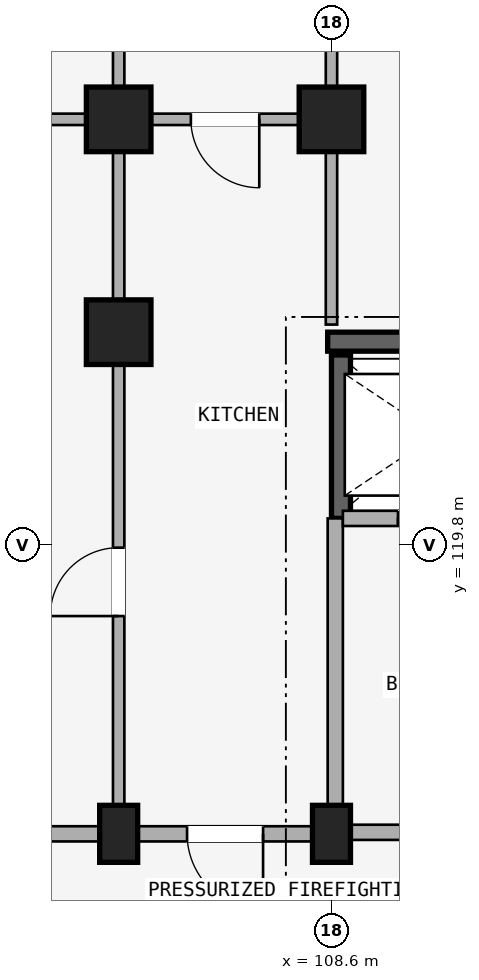
"""IFC4 building model, lengths in metres.
Left out: names, types, materials, properties, quantities, classifications, styles, units other than length and angle.
Written with IfcOpenShell. Run it as: python <this file> out.ifc"""

import sys

from ifc_helpers import new_model, si_unit, direction, frame, frame_2d, origin, origin_2d, place, context, subcontext, project, spatial, rectangle, extrude, element, fill, save


model = new_model("IFC4")
c1 = context("Model", 3, precision=1e-05, world=origin(), true_north=direction((0.0, 1.0)))
c2 = subcontext(c1, "Body", "Model", "MODEL_VIEW")
j1 = project(units=[si_unit("LENGTHUNIT", "METRE"), si_unit("PLANEANGLEUNIT", "RADIAN")], contexts=[c1])
p1 = place(None, origin())
s1 = spatial("IfcSite", under=j1, at=p1, CompositionType="ELEMENT")
p2 = place(p1, origin())
s2 = spatial("IfcBuilding", under=s1, at=p2, CompositionType="ELEMENT")
p3 = place(p2, frame((0.0, 0.0, 4.5)))
s3 = spatial("IfcBuildingStorey", under=s2, at=p3, CompositionType="ELEMENT", Elevation=4.5)
p4 = place(p3, frame((111.35, 122.475, 0.0), z_axis=(0.0, 0.0, 1.0), x_axis=(-1.0, 0.0, 0.0)))
e1 = element("IfcWall", 1, at=p4, inside=s3, PredefinedType="SHEAR", context=c2, shape_type="SweptSolid", body=[
    extrude(rectangle(XDim=2.8, YDim=0.25, at=frame_2d((1.4, 0.0))), origin(), (0.0, 0.0, 1.0), 3.98),
])
p5 = place(p3, frame((108.725, 120.15, 0.0), z_axis=(0.0, 0.0, 1.0), x_axis=(0.0, 1.0, 0.0)))
e2 = element("IfcWall", 2, at=p5, inside=s3, PredefinedType="SHEAR", context=c2, shape_type="SweptSolid", body=[
    extrude(rectangle(XDim=2.15, YDim=0.25, at=frame_2d((1.075, 0.0))), origin(), (0.0, 0.0, 1.0), 3.98),
])
p6 = place(p3, frame((108.6, 116.0, 0.0), z_axis=(0.0, 0.0, 1.0), x_axis=(1.0, 0.0, 0.0)))
e3 = element("IfcColumn", 3, at=p6, inside=s3, PredefinedType="COLUMN", context=c2, shape_type="SweptSolid", body=[
    extrude(rectangle(XDim=0.5, YDim=0.75, at=origin_2d()), origin(), (0.0, 0.0, 1.0), 3.98),
])
p7 = place(p3, frame((108.6, 125.4, 0.0), z_axis=(0.0, 0.0, 1.0), x_axis=(1.0, 0.0, 0.0)))
e4 = element("IfcColumn", 4, at=p7, inside=s3, PredefinedType="COLUMN", context=c2, shape_type="SweptSolid", body=[
    extrude(rectangle(XDim=0.85, YDim=0.85, at=origin_2d()), origin(), (0.0, 0.0, 1.0), 3.98),
])
p8 = place(p3, frame((105.8, 116.0, 0.0), z_axis=(0.0, 0.0, 1.0), x_axis=(1.0, 0.0, 0.0)))
e5 = element("IfcColumn", 5, at=p8, inside=s3, PredefinedType="COLUMN", context=c2, shape_type="SweptSolid", body=[
    extrude(rectangle(XDim=0.5, YDim=0.75, at=origin_2d()), origin(), (0.0, 0.0, 1.0), 3.98),
])
for number, where, z_axis, x_axis in (
    (6, (105.8, 122.6, 0.0), (0.0, 0.0, 1.0), (1.0, 0.0, 0.0)),
    (7, (105.8, 125.4, 0.0), (0.0, 0.0, 1.0), (1.0, 0.0, 0.0)),
):
    element("IfcColumn", number, at=place(p3, frame(where, z_axis=z_axis, x_axis=x_axis)), inside=s3, PredefinedType="COLUMN", context=c2, shape_type="SweptSolid", body=[
        extrude(rectangle(XDim=0.85, YDim=0.85, at=origin_2d()), origin(), (0.0, 0.0, 1.0), 3.98),
    ])
p9 = place(p3, frame((114.3, 116.02, 0.0), z_axis=(0.0, 0.0, 1.0), x_axis=(-1.0, 0.0, 0.0)))
e8 = element("IfcWall", 8, at=p9, inside=s3, PredefinedType="STANDARD", context=c2, shape_type="SweptSolid", body=[
    extrude(rectangle(XDim=5.65, YDim=0.2, at=frame_2d((2.825, 0.0))), origin(), (0.0, 0.0, 1.0), 3.322),
])
p10 = place(p9, frame((1.923, 0.0, 0.0)))
e9 = element("IfcOpeningElement", 9, at=p10, cuts=e8, PredefinedType="OPENING", context=c2, shape_type="SweptSolid", body=[
    extrude(rectangle(XDim=1.24, YDim=2.15, at=frame_2d((0.62, 1.075))), frame((0.0, 0.11, 0.0), z_axis=(0.0, -1.0, 0.0), x_axis=(1.0, 0.0, 0.0)), (0.0, 0.0, 1.0), 0.22),
])
p11 = place(p3, frame((108.65, 116.02, 0.0), z_axis=(0.0, 0.0, 1.0), x_axis=(0.0, 1.0, 0.0)))
e10 = element("IfcWall", 10, at=p11, inside=s3, PredefinedType="STANDARD", context=c2, shape_type="SweptSolid", body=[
    extrude(rectangle(XDim=4.13, YDim=0.2, at=frame_2d((2.065, 0.0))), origin(), (0.0, 0.0, 1.0), 3.322),
])
p12 = place(p3, frame((111.3, 120.15, 0.0), z_axis=(0.0, 0.0, 1.0), x_axis=(-1.0, 0.0, 0.0)))
e11 = element("IfcWall", 11, at=p12, inside=s3, PredefinedType="STANDARD", context=c2, shape_type="SweptSolid", body=[
    extrude(rectangle(XDim=2.55, YDim=0.2, at=frame_2d((1.275, 0.0))), origin(), (0.0, 0.0, 1.0), 3.322),
])
p13 = place(p12, frame((0.725, 0.0, 0.0)))
e12 = element("IfcOpeningElement", 12, at=p13, cuts=e11, PredefinedType="OPENING", context=c2, shape_type="SweptSolid", body=[
    extrude(rectangle(XDim=1.1, YDim=2.15, at=frame_2d((0.55, 1.075))), frame((0.0, 0.11, 0.0), z_axis=(0.0, -1.0, 0.0), x_axis=(1.0, 0.0, 0.0)), (0.0, 0.0, 1.0), 0.22),
])
p14 = place(p3, frame((108.6, 116.0, 0.0), z_axis=(0.0, 0.0, 1.0), x_axis=(-1.0, 0.0, 0.0)))
e13 = element("IfcWall", 13, at=p14, inside=s3, PredefinedType="STANDARD", context=c2, shape_type="SweptSolid", body=[
    extrude(rectangle(XDim=2.8, YDim=0.2, at=frame_2d((1.4, 0.0))), origin(), (0.0, 0.0, 1.0), 3.322),
])
p15 = place(p14, frame((0.9, 0.0, 0.0)))
e14 = element("IfcOpeningElement", 14, at=p15, cuts=e13, PredefinedType="OPENING", context=c2, shape_type="SweptSolid", body=[
    extrude(rectangle(XDim=1.0, YDim=2.15, at=frame_2d((0.5, 1.075))), frame((0.0, 0.11, 0.0), z_axis=(0.0, -1.0, 0.0), x_axis=(1.0, 0.0, 0.0)), (0.0, 0.0, 1.0), 0.22),
])
p16 = place(p3, frame((108.52, 125.4, 0.0), z_axis=(0.0, 0.0, 1.0), x_axis=(-1.0, 0.0, 0.0)))
e15 = element("IfcWall", 15, at=p16, inside=s3, PredefinedType="PLUMBINGWALL", context=c2, shape_type="SweptSolid", body=[
    extrude(rectangle(XDim=2.64, YDim=0.15, at=frame_2d((1.32, 0.0))), origin(), (0.0, 0.0, 1.0), 3.322),
])
p17 = place(p16, frame((0.87, 0.0, 0.0)))
e16 = element("IfcOpeningElement", 16, at=p17, cuts=e15, PredefinedType="OPENING", context=c2, shape_type="SweptSolid", body=[
    extrude(rectangle(XDim=0.9, YDim=2.1, at=frame_2d((0.45, 1.05))), frame((0.0, 0.085, 0.0), z_axis=(0.0, -1.0, 0.0), x_axis=(1.0, 0.0, 0.0)), (0.0, 0.0, 1.0), 0.17),
])
p18 = place(p3, frame((105.8, 116.0, 0.0), z_axis=(0.0, 0.0, 1.0), x_axis=(-1.0, 0.0, 0.0)))
e17 = element("IfcWall", 17, at=p18, inside=s3, PredefinedType="STANDARD", context=c2, shape_type="SweptSolid", body=[
    extrude(rectangle(XDim=2.8, YDim=0.2, at=frame_2d((1.4, 0.0))), origin(), (0.0, 0.0, 1.0), 3.322),
])
p19 = place(p3, frame((105.72, 125.4, 0.0), z_axis=(0.0, 0.0, 1.0), x_axis=(-1.0, 0.0, 0.0)))
e18 = element("IfcWall", 18, at=p19, inside=s3, PredefinedType="PLUMBINGWALL", context=c2, shape_type="SweptSolid", body=[
    extrude(rectangle(XDim=2.64, YDim=0.15, at=frame_2d((1.32, 0.0))), origin(), (0.0, 0.0, 1.0), 3.322),
])
p20 = place(p19, frame((0.92, 0.0, 0.0)))
e19 = element("IfcOpeningElement", 19, at=p20, cuts=e18, PredefinedType="OPENING", context=c2, shape_type="SweptSolid", body=[
    extrude(rectangle(XDim=0.8, YDim=2.1, at=frame_2d((0.4, 1.05))), frame((0.0, 0.085, 0.0), z_axis=(0.0, -1.0, 0.0), x_axis=(1.0, 0.0, 0.0)), (0.0, 0.0, 1.0), 0.17),
])
p21 = place(p3, frame((108.6, 122.7, 0.0), z_axis=(0.0, 0.0, 1.0), x_axis=(0.0, 1.0, 0.0)))
e20 = element("IfcWall", 20, at=p21, inside=s3, PredefinedType="PARTITIONING", context=c2, shape_type="SweptSolid", body=[
    extrude(rectangle(XDim=10.82, YDim=0.15, at=frame_2d((5.41, 0.0))), origin(), (0.0, 0.0, 1.0), 3.322),
])
p22 = place(p21, frame((3.7, 0.0, 0.0)))
e21 = element("IfcOpeningElement", 21, at=p22, cuts=e20, PredefinedType="OPENING", context=c2, shape_type="SweptSolid", body=[
    extrude(rectangle(XDim=0.8, YDim=2.1, at=frame_2d((0.4, 1.05))), frame((0.0, 0.085, 0.0), z_axis=(0.0, -1.0, 0.0), x_axis=(1.0, 0.0, 0.0)), (0.0, 0.0, 1.0), 0.17),
])
p23 = place(p3, frame((105.8, 116.05, 0.0), z_axis=(0.0, 0.0, 1.0), x_axis=(0.0, 1.0, 0.0)))
e22 = element("IfcWall", 22, at=p23, inside=s3, PredefinedType="PARTITIONING", context=c2, shape_type="SweptSolid", body=[
    extrude(rectangle(XDim=6.53, YDim=0.15, at=frame_2d((3.265, 0.0))), origin(), (0.0, 0.0, 1.0), 3.322),
])
p24 = place(p23, frame((2.815, 0.0, 0.0)))
e23 = element("IfcOpeningElement", 23, at=p24, cuts=e22, PredefinedType="OPENING", context=c2, shape_type="SweptSolid", body=[
    extrude(rectangle(XDim=0.9, YDim=2.1, at=frame_2d((0.45, 1.05))), frame((0.0, 0.085, 0.0), z_axis=(0.0, -1.0, 0.0), x_axis=(1.0, 0.0, 0.0)), (0.0, 0.0, 1.0), 0.17),
])
p25 = place(p3, frame((105.8, 122.7, 0.0), z_axis=(0.0, 0.0, 1.0), x_axis=(0.0, 1.0, 0.0)))
e24 = element("IfcWall", 24, at=p25, inside=s3, PredefinedType="PARTITIONING", context=c2, shape_type="SweptSolid", body=[
    extrude(rectangle(XDim=10.82, YDim=0.15, at=frame_2d((5.41, 0.0))), origin(), (0.0, 0.0, 1.0), 3.322),
])
p26 = place(p25, frame((3.7, 0.0, 0.0)))
e25 = element("IfcOpeningElement", 25, at=p26, cuts=e24, PredefinedType="OPENING", context=c2, shape_type="SweptSolid", body=[
    extrude(rectangle(XDim=0.8, YDim=2.1, at=frame_2d((0.4, 1.05))), frame((0.0, 0.085, 0.0), z_axis=(0.0, -1.0, 0.0), x_axis=(1.0, 0.0, 0.0)), (0.0, 0.0, 1.0), 0.17),
])
p27 = place(p13, origin())
e26 = element("IfcDoor", 26, at=p27, inside=s3, OperationType="SLIDING_TO_LEFT", PredefinedType="DOOR", context=c2, shape_type="SweptSolid", body=[
    extrude(rectangle(XDim=1.1, YDim=2.15, at=frame_2d((0.55, 1.075))), frame((0.0, 0.025, 0.0), z_axis=(0.0, -1.0, 0.0), x_axis=(1.0, 0.0, 0.0)), (0.0, 0.0, 1.0), 0.05),
])
fill(e12, e26)
p28 = place(p17, origin())
e27 = element("IfcDoor", 27, at=p28, inside=s3, OperationType="SINGLE_SWING_LEFT", PredefinedType="DOOR", context=c2, shape_type="SweptSolid", body=[
    extrude(rectangle(XDim=0.9, YDim=2.1, at=frame_2d((0.45, 1.05))), frame((0.0, 0.025, 0.0), z_axis=(0.0, -1.0, 0.0), x_axis=(1.0, 0.0, 0.0)), (0.0, 0.0, 1.0), 0.05),
])
fill(e16, e27)
p29 = place(p15, frame((1.0, 0.0, 0.0), z_axis=(0.0, 0.0, 1.0), x_axis=(-1.0, 0.0, 0.0)))
e28 = element("IfcDoor", 28, at=p29, inside=s3, OperationType="SINGLE_SWING_RIGHT", PredefinedType="DOOR", context=c2, shape_type="SweptSolid", body=[
    extrude(rectangle(XDim=1.0, YDim=2.15, at=frame_2d((0.5, 1.075))), frame((0.0, 0.025, 0.0), z_axis=(0.0, -1.0, 0.0), x_axis=(1.0, 0.0, 0.0)), (0.0, 0.0, 1.0), 0.05),
])
fill(e14, e28)
p30 = place(p24, frame((0.9, 0.0, 0.0), z_axis=(0.0, 0.0, 1.0), x_axis=(-1.0, 0.0, 0.0)))
e29 = element("IfcDoor", 29, at=p30, inside=s3, OperationType="SINGLE_SWING_RIGHT", PredefinedType="DOOR", context=c2, shape_type="SweptSolid", body=[
    extrude(rectangle(XDim=0.9, YDim=2.1, at=frame_2d((0.45, 1.05))), frame((0.0, 0.025, 0.0), z_axis=(0.0, -1.0, 0.0), x_axis=(1.0, 0.0, 0.0)), (0.0, 0.0, 1.0), 0.05),
])
fill(e23, e29)
save(model, sys.argv[1])
